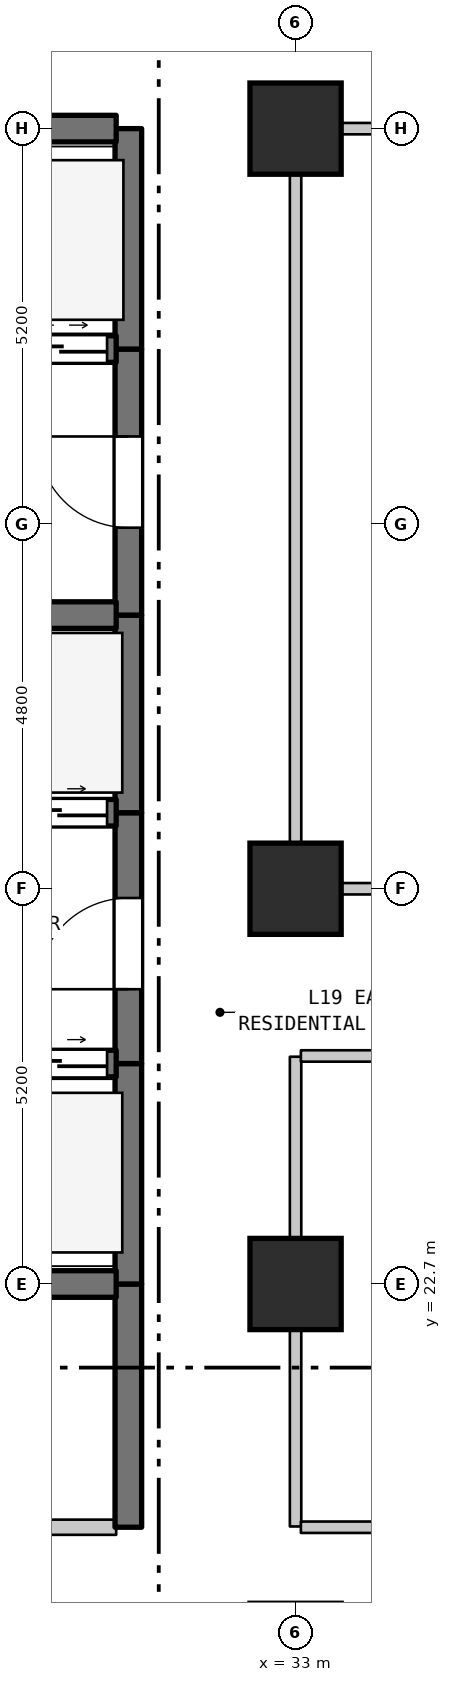
"""IFC4 building model, lengths in metres.
Left out: names, types, materials, properties, quantities, classifications, styles, units other than length and angle.
Written with IfcOpenShell. Run it as: python <this file> out.ifc"""

import sys

from ifc_helpers import new_model, si_unit, direction, frame, frame_2d, origin, origin_2d, place, context, subcontext, project, spatial, rectangle, extrude, element, fill, save


model = new_model("IFC4")
c1 = context("Model", 3, precision=1e-05, world=origin(), true_north=direction((0.0, 1.0)))
c2 = subcontext(c1, "Body", "Model", "MODEL_VIEW")
j1 = project(units=[si_unit("LENGTHUNIT", "METRE"), si_unit("PLANEANGLEUNIT", "RADIAN")], contexts=[c1])
p1 = place(None, origin())
s1 = spatial("IfcSite", under=j1, at=p1, CompositionType="ELEMENT")
p2 = place(p1, origin())
s2 = spatial("IfcBuilding", under=s1, at=p2, CompositionType="ELEMENT")
p3 = place(p2, frame((0.0, 0.0, 81.2)))
s3 = spatial("IfcBuildingStorey", under=s2, at=p3, CompositionType="ELEMENT", Elevation=81.2)
for number, where, z_axis, x_axis in (
    (1, (33.0, 22.7, 0.0), (0.0, 0.0, 1.0), (1.0, 0.0, 0.0)),
    (2, (33.0, 27.9, 0.0), (0.0, 0.0, 1.0), (1.0, 0.0, 0.0)),
    (3, (33.0, 37.9, 0.0), (0.0, 0.0, 1.0), (1.0, 0.0, 0.0)),
):
    element("IfcColumn", number, at=place(p3, frame(where, z_axis=z_axis, x_axis=x_axis)), inside=s3, PredefinedType="COLUMN", context=c2, shape_type="SweptSolid", body=[
        extrude(rectangle(XDim=1.2, YDim=1.2, at=origin_2d()), origin(), (0.0, 0.0, 1.0), 5.2),
    ])
p4 = place(p3, frame((30.8, 19.5, 0.0), z_axis=(0.0, 0.0, 1.0), x_axis=(0.0, 1.0, 0.0)))
e4 = element("IfcWall", 4, at=p4, inside=s3, PredefinedType="SHEAR", context=c2, shape_type="SweptSolid", body=[
    extrude(rectangle(XDim=3.2, YDim=0.35, at=frame_2d((1.6, 0.0))), origin(), (0.0, 0.0, 1.0), 4.885),
])
p5 = place(p3, frame((30.8, 22.7, 0.0), z_axis=(0.0, 0.0, 1.0), x_axis=(0.0, 1.0, 0.0)))
e5 = element("IfcWall", 5, at=p5, inside=s3, PredefinedType="SHEAR", context=c2, shape_type="SweptSolid", body=[
    extrude(rectangle(XDim=2.9, YDim=0.35, at=frame_2d((1.45, 0.0))), origin(), (0.0, 0.0, 1.0), 4.885),
])
p6 = place(p3, frame((30.8, 25.6, 0.0), z_axis=(0.0, 0.0, 1.0), x_axis=(0.0, 1.0, 0.0)))
e6 = element("IfcWall", 6, at=p6, inside=s3, PredefinedType="SHEAR", context=c2, shape_type="SweptSolid", body=[
    extrude(rectangle(XDim=3.3, YDim=0.35, at=frame_2d((1.65, 0.0))), origin(), (0.0, 0.0, 1.0), 4.885),
])
p7 = place(p6, frame((0.978, 0.0, 0.0)))
e7 = element("IfcOpeningElement", 7, at=p7, cuts=e6, PredefinedType="OPENING", context=c2, shape_type="SweptSolid", body=[
    extrude(rectangle(XDim=1.2, YDim=2.2, at=frame_2d((0.6, 1.1))), frame((0.0, 0.185, 0.0), z_axis=(0.0, -1.0, 0.0), x_axis=(1.0, 0.0, 0.0)), (0.0, 0.0, 1.0), 0.37),
])
p8 = place(p3, frame((30.8, 28.9, 0.0), z_axis=(0.0, 0.0, 1.0), x_axis=(0.0, 1.0, 0.0)))
e8 = element("IfcWall", 8, at=p8, inside=s3, PredefinedType="SHEAR", context=c2, shape_type="SweptSolid", body=[
    extrude(rectangle(XDim=2.6, YDim=0.35, at=frame_2d((1.3, 0.0))), origin(), (0.0, 0.0, 1.0), 4.885),
])
p9 = place(p3, frame((30.8, 31.5, 0.0), z_axis=(0.0, 0.0, 1.0), x_axis=(0.0, 1.0, 0.0)))
e9 = element("IfcWall", 9, at=p9, inside=s3, PredefinedType="SHEAR", context=c2, shape_type="SweptSolid", body=[
    extrude(rectangle(XDim=3.5, YDim=0.35, at=frame_2d((1.75, 0.0))), origin(), (0.0, 0.0, 1.0), 4.885),
])
p10 = place(p9, frame((1.15, 0.0, 0.0)))
e10 = element("IfcOpeningElement", 10, at=p10, cuts=e9, PredefinedType="OPENING", context=c2, shape_type="SweptSolid", body=[
    extrude(rectangle(XDim=1.2, YDim=2.2, at=frame_2d((0.6, 1.1))), frame((0.0, 0.185, 0.0), z_axis=(0.0, -1.0, 0.0), x_axis=(1.0, 0.0, 0.0)), (0.0, 0.0, 1.0), 0.37),
])
p11 = place(p3, frame((30.8, 35.0, 0.0), z_axis=(0.0, 0.0, 1.0), x_axis=(0.0, 1.0, 0.0)))
e11 = element("IfcWall", 11, at=p11, inside=s3, PredefinedType="SHEAR", context=c2, shape_type="SweptSolid", body=[
    extrude(rectangle(XDim=2.9, YDim=0.35, at=frame_2d((1.45, 0.0))), origin(), (0.0, 0.0, 1.0), 4.885),
])
p12 = place(p3, frame((33.0, 19.51, 0.0), z_axis=(0.0, 0.0, 1.0), x_axis=(0.0, 1.0, 0.0)))
e12 = element("IfcWall", 12, at=p12, inside=s3, PredefinedType="STANDARD", context=c2, shape_type="SweptSolid", body=[
    extrude(rectangle(XDim=6.18, YDim=0.15, at=frame_2d((3.09, 0.0))), origin(), (0.0, 0.0, 1.0), 4.435),
])
p13 = place(p3, frame((33.0, 27.91, 0.0), z_axis=(0.0, 0.0, 1.0), x_axis=(0.0, 1.0, 0.0)))
e13 = element("IfcWall", 13, at=p13, inside=s3, PredefinedType="STANDARD", context=c2, shape_type="SweptSolid", body=[
    extrude(rectangle(XDim=9.98, YDim=0.15, at=frame_2d((4.99, 0.0))), origin(), (0.0, 0.0, 1.0), 4.385),
])
p14 = place(p3, frame((25.985, 19.5, 0.0), z_axis=(0.0, 0.0, 1.0), x_axis=(1.0, 0.0, 0.0)))
e14 = element("IfcWall", 14, at=p14, inside=s3, PredefinedType="STANDARD", context=c2, shape_type="SweptSolid", body=[
    extrude(rectangle(XDim=4.655, YDim=0.2, at=frame_2d((2.327, 0.0))), origin(), (0.0, 0.0, 1.0), 4.885),
])
p15 = place(p14, frame((1.845, 0.0, 0.0)))
e15 = element("IfcOpeningElement", 15, at=p15, cuts=e14, PredefinedType="OPENING", context=c2, shape_type="SweptSolid", body=[
    extrude(rectangle(XDim=0.9, YDim=2.15, at=frame_2d((0.45, 1.075))), frame((0.0, 0.11, 0.0), z_axis=(0.0, -1.0, 0.0), x_axis=(1.0, 0.0, 0.0)), (0.0, 0.0, 1.0), 0.22),
])
p16 = place(p3, frame((33.07, 19.5, 0.0), z_axis=(0.0, 0.0, 1.0), x_axis=(1.0, 0.0, 0.0)))
e16 = element("IfcWall", 16, at=p16, inside=s3, PredefinedType="STANDARD", context=c2, shape_type="SweptSolid", body=[
    extrude(rectangle(XDim=33.27, YDim=0.15, at=frame_2d((16.635, 0.0))), origin(), (0.0, 0.0, 1.0), 4.885),
])
p17 = place(p16, frame((16.065, 0.0, 0.0)))
e17 = element("IfcOpeningElement", 17, at=p17, cuts=e16, PredefinedType="OPENING", context=c2, shape_type="SweptSolid", body=[
    extrude(rectangle(XDim=1.0, YDim=2.15, at=frame_2d((0.5, 1.075))), frame((0.0, 0.085, 0.0), z_axis=(0.0, -1.0, 0.0), x_axis=(1.0, 0.0, 0.0)), (0.0, 0.0, 1.0), 0.17),
])
p18 = place(p3, frame((27.46, 22.7, 0.0), z_axis=(0.0, 0.0, 1.0), x_axis=(1.0, 0.0, 0.0)))
e18 = element("IfcWall", 18, at=p18, inside=s3, PredefinedType="SHEAR", context=c2, shape_type="SweptSolid", body=[
    extrude(rectangle(XDim=3.18, YDim=0.35, at=frame_2d((1.59, 0.0))), origin(), (0.0, 0.0, 1.0), 4.885),
])
p19 = place(p3, frame((27.46, 25.6, 0.0), z_axis=(0.0, 0.0, 1.0), x_axis=(1.0, 0.0, 0.0)))
e19 = element("IfcWall", 19, at=p19, inside=s3, PredefinedType="SHEAR", context=c2, shape_type="SweptSolid", body=[
    extrude(rectangle(XDim=3.18, YDim=0.35, at=frame_2d((1.59, 0.0))), origin(), (0.0, 0.0, 1.0), 4.885),
])
p20 = place(p19, frame((0.12, 0.0, 0.0)))
e20 = element("IfcOpeningElement", 20, at=p20, cuts=e19, PredefinedType="OPENING", context=c2, shape_type="SweptSolid", body=[
    extrude(rectangle(XDim=1.25, YDim=2.2, at=frame_2d((0.625, 1.1))), frame((0.0, 0.185, 0.0), z_axis=(0.0, -1.0, 0.0), x_axis=(1.0, 0.0, 0.0)), (0.0, 0.0, 1.0), 0.37),
])
p21 = place(p19, frame((1.81, 0.0, 0.0)))
e21 = element("IfcOpeningElement", 21, at=p21, cuts=e19, PredefinedType="OPENING", context=c2, shape_type="SweptSolid", body=[
    extrude(rectangle(XDim=1.25, YDim=2.2, at=frame_2d((0.625, 1.1))), frame((0.0, 0.185, 0.0), z_axis=(0.0, -1.0, 0.0), x_axis=(1.0, 0.0, 0.0)), (0.0, 0.0, 1.0), 0.37),
])
p22 = place(p3, frame((33.07, 25.7, 0.0), z_axis=(0.0, 0.0, 1.0), x_axis=(1.0, 0.0, 0.0)))
e22 = element("IfcWall", 22, at=p22, inside=s3, PredefinedType="STANDARD", context=c2, shape_type="SweptSolid", body=[
    extrude(rectangle(XDim=30.87, YDim=0.15, at=frame_2d((15.435, 0.0))), origin(), (0.0, 0.0, 1.0), 4.885),
])
p23 = place(p3, frame((33.07, 27.9, 0.0), z_axis=(0.0, 0.0, 1.0), x_axis=(1.0, 0.0, 0.0)))
e23 = element("IfcWall", 23, at=p23, inside=s3, PredefinedType="STANDARD", context=c2, shape_type="SweptSolid", body=[
    extrude(rectangle(XDim=11.93, YDim=0.15, at=frame_2d((5.965, 0.0))), origin(), (0.0, 0.0, 1.0), 4.385),
])
p24 = place(p3, frame((27.46, 28.9, 0.0), z_axis=(0.0, 0.0, 1.0), x_axis=(1.0, 0.0, 0.0)))
e24 = element("IfcWall", 24, at=p24, inside=s3, PredefinedType="SHEAR", context=c2, shape_type="SweptSolid", body=[
    extrude(rectangle(XDim=3.18, YDim=0.35, at=frame_2d((1.59, 0.0))), origin(), (0.0, 0.0, 1.0), 4.885),
])
p25 = place(p24, frame((0.12, 0.0, 0.0)))
e25 = element("IfcOpeningElement", 25, at=p25, cuts=e24, PredefinedType="OPENING", context=c2, shape_type="SweptSolid", body=[
    extrude(rectangle(XDim=1.25, YDim=2.2, at=frame_2d((0.625, 1.1))), frame((0.0, 0.185, 0.0), z_axis=(0.0, -1.0, 0.0), x_axis=(1.0, 0.0, 0.0)), (0.0, 0.0, 1.0), 0.37),
])
p26 = place(p24, frame((1.81, 0.0, 0.0)))
e26 = element("IfcOpeningElement", 26, at=p26, cuts=e24, PredefinedType="OPENING", context=c2, shape_type="SweptSolid", body=[
    extrude(rectangle(XDim=1.25, YDim=2.2, at=frame_2d((0.625, 1.1))), frame((0.0, 0.185, 0.0), z_axis=(0.0, -1.0, 0.0), x_axis=(1.0, 0.0, 0.0)), (0.0, 0.0, 1.0), 0.37),
])
p27 = place(p3, frame((27.46, 31.5, 0.0), z_axis=(0.0, 0.0, 1.0), x_axis=(1.0, 0.0, 0.0)))
e27 = element("IfcWall", 27, at=p27, inside=s3, PredefinedType="SHEAR", context=c2, shape_type="SweptSolid", body=[
    extrude(rectangle(XDim=3.18, YDim=0.35, at=frame_2d((1.59, 0.0))), origin(), (0.0, 0.0, 1.0), 4.885),
])
p28 = place(p3, frame((19.16, 35.0, 0.0), z_axis=(0.0, 0.0, 1.0), x_axis=(1.0, 0.0, 0.0)))
e28 = element("IfcWall", 28, at=p28, inside=s3, PredefinedType="SHEAR", context=c2, shape_type="SweptSolid", body=[
    extrude(rectangle(XDim=11.48, YDim=0.35, at=frame_2d((5.74, 0.0))), origin(), (0.0, 0.0, 1.0), 4.885),
])
p29 = place(p28, frame((0.365, 0.0, 0.0)))
e29 = element("IfcOpeningElement", 29, at=p29, cuts=e28, PredefinedType="OPENING", context=c2, shape_type="SweptSolid", body=[
    extrude(rectangle(XDim=1.35, YDim=2.2, at=frame_2d((0.675, 1.1))), frame((0.0, 0.185, 0.0), z_axis=(0.0, -1.0, 0.0), x_axis=(1.0, 0.0, 0.0)), (0.0, 0.0, 1.0), 0.37),
])
p30 = place(p28, frame((2.765, 0.0, 0.0)))
e30 = element("IfcOpeningElement", 30, at=p30, cuts=e28, PredefinedType="OPENING", context=c2, shape_type="SweptSolid", body=[
    extrude(rectangle(XDim=1.35, YDim=2.2, at=frame_2d((0.675, 1.1))), frame((0.0, 0.185, 0.0), z_axis=(0.0, -1.0, 0.0), x_axis=(1.0, 0.0, 0.0)), (0.0, 0.0, 1.0), 0.37),
])
p31 = place(p28, frame((4.915, 0.0, 0.0)))
e31 = element("IfcOpeningElement", 31, at=p31, cuts=e28, PredefinedType="OPENING", context=c2, shape_type="SweptSolid", body=[
    extrude(rectangle(XDim=1.2, YDim=2.2, at=frame_2d((0.6, 1.1))), frame((0.0, 0.185, 0.0), z_axis=(0.0, -1.0, 0.0), x_axis=(1.0, 0.0, 0.0)), (0.0, 0.0, 1.0), 0.37),
])
p32 = place(p28, frame((6.665, 0.0, 0.0)))
e32 = element("IfcOpeningElement", 32, at=p32, cuts=e28, PredefinedType="OPENING", context=c2, shape_type="SweptSolid", body=[
    extrude(rectangle(XDim=1.2, YDim=2.2, at=frame_2d((0.6, 1.1))), frame((0.0, 0.185, 0.0), z_axis=(0.0, -1.0, 0.0), x_axis=(1.0, 0.0, 0.0)), (0.0, 0.0, 1.0), 0.37),
])
p33 = place(p28, frame((8.415, 0.0, 0.0)))
e33 = element("IfcOpeningElement", 33, at=p33, cuts=e28, PredefinedType="OPENING", context=c2, shape_type="SweptSolid", body=[
    extrude(rectangle(XDim=1.2, YDim=2.2, at=frame_2d((0.6, 1.1))), frame((0.0, 0.185, 0.0), z_axis=(0.0, -1.0, 0.0), x_axis=(1.0, 0.0, 0.0)), (0.0, 0.0, 1.0), 0.37),
])
p34 = place(p28, frame((10.16, 0.0, 0.0)))
e34 = element("IfcOpeningElement", 34, at=p34, cuts=e28, PredefinedType="OPENING", context=c2, shape_type="SweptSolid", body=[
    extrude(rectangle(XDim=1.2, YDim=2.2, at=frame_2d((0.6, 1.1))), frame((0.0, 0.185, 0.0), z_axis=(0.0, -1.0, 0.0), x_axis=(1.0, 0.0, 0.0)), (0.0, 0.0, 1.0), 0.37),
])
p35 = place(p3, frame((19.16, 37.9, 0.0), z_axis=(0.0, 0.0, 1.0), x_axis=(1.0, 0.0, 0.0)))
e35 = element("IfcWall", 35, at=p35, inside=s3, PredefinedType="SHEAR", context=c2, shape_type="SweptSolid", body=[
    extrude(rectangle(XDim=11.48, YDim=0.35, at=frame_2d((5.74, 0.0))), origin(), (0.0, 0.0, 1.0), 4.885),
])
p36 = place(p3, frame((33.07, 37.9, 0.0), z_axis=(0.0, 0.0, 1.0), x_axis=(1.0, 0.0, 0.0)))
e36 = element("IfcWall", 36, at=p36, inside=s3, PredefinedType="STANDARD", context=c2, shape_type="SweptSolid", body=[
    extrude(rectangle(XDim=25.985, YDim=0.15, at=frame_2d((12.992, 0.0))), origin(), (0.0, 0.0, 1.0), 4.885),
])
p37 = place(p7, origin())
e37 = element("IfcDoor", 37, at=p37, inside=s3, OperationType="SINGLE_SWING_LEFT", PredefinedType="DOOR", context=c2, shape_type="SweptSolid", body=[
    extrude(rectangle(XDim=1.2, YDim=2.2, at=frame_2d((0.6, 1.1))), frame((0.0, 0.025, 0.0), z_axis=(0.0, -1.0, 0.0), x_axis=(1.0, 0.0, 0.0)), (0.0, 0.0, 1.0), 0.05),
])
fill(e7, e37)
p38 = place(p10, origin())
e38 = element("IfcDoor", 38, at=p38, inside=s3, OperationType="SINGLE_SWING_RIGHT", PredefinedType="DOOR", context=c2, shape_type="SweptSolid", body=[
    extrude(rectangle(XDim=1.2, YDim=2.2, at=frame_2d((0.6, 1.1))), frame((0.0, 0.025, 0.0), z_axis=(0.0, -1.0, 0.0), x_axis=(1.0, 0.0, 0.0)), (0.0, 0.0, 1.0), 0.05),
])
fill(e10, e38)
p39 = place(p21, origin())
e39 = element("IfcDoor", 39, at=p39, inside=s3, OperationType="DOUBLE_DOOR_SLIDING", PredefinedType="DOOR", context=c2, shape_type="SweptSolid", body=[
    extrude(rectangle(XDim=1.25, YDim=2.2, at=frame_2d((0.625, 1.1))), frame((0.0, 0.025, 0.0), z_axis=(0.0, -1.0, 0.0), x_axis=(1.0, 0.0, 0.0)), (0.0, 0.0, 1.0), 0.05),
])
fill(e21, e39)
p40 = place(p26, origin())
e40 = element("IfcDoor", 40, at=p40, inside=s3, OperationType="DOUBLE_DOOR_SLIDING", PredefinedType="DOOR", context=c2, shape_type="SweptSolid", body=[
    extrude(rectangle(XDim=1.25, YDim=2.2, at=frame_2d((0.625, 1.1))), frame((0.0, 0.025, 0.0), z_axis=(0.0, -1.0, 0.0), x_axis=(1.0, 0.0, 0.0)), (0.0, 0.0, 1.0), 0.05),
])
fill(e26, e40)
p41 = place(p34, origin())
e41 = element("IfcDoor", 41, at=p41, inside=s3, OperationType="DOUBLE_DOOR_SLIDING", PredefinedType="DOOR", context=c2, shape_type="SweptSolid", body=[
    extrude(rectangle(XDim=1.2, YDim=2.2, at=frame_2d((0.6, 1.1))), frame((0.0, 0.025, 0.0), z_axis=(0.0, -1.0, 0.0), x_axis=(1.0, 0.0, 0.0)), (0.0, 0.0, 1.0), 0.05),
])
fill(e34, e41)
save(model, sys.argv[1])
